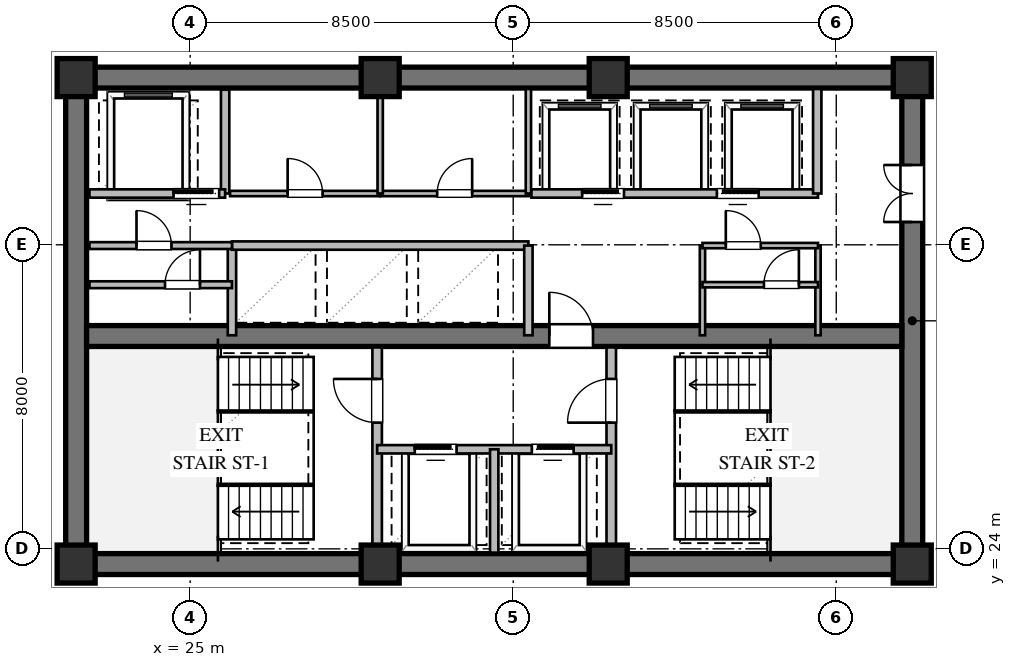
"""IFC4 building model, lengths in metres.
Left out: names, types, materials, properties, quantities, classifications, styles, units other than length and angle.
Written with IfcOpenShell. Run it as: python <this file> out.ifc"""

import sys

from ifc_helpers import new_model, si_unit, direction, frame, frame_2d, origin, origin_2d, place, context, subcontext, project, spatial, rectangle, extrude, element, fill, save


model = new_model("IFC4")
c1 = context("Model", 3, precision=1e-05, world=origin(), true_north=direction((0.0, 1.0)))
c2 = subcontext(c1, "Body", "Model", "MODEL_VIEW")
j1 = project(units=[si_unit("LENGTHUNIT", "METRE"), si_unit("PLANEANGLEUNIT", "RADIAN")], contexts=[c1])
p1 = place(None, origin())
s1 = spatial("IfcSite", under=j1, at=p1, CompositionType="ELEMENT")
p2 = place(p1, origin())
s2 = spatial("IfcBuilding", under=s1, at=p2, CompositionType="ELEMENT")
p3 = place(p2, frame((0.0, 0.0, 156.6)))
s3 = spatial("IfcBuildingStorey", under=s2, at=p3, CompositionType="ELEMENT", Elevation=156.6)
for number, where, z_axis, x_axis in (
    (1, (21.725, 23.6, 0.0), (0.0, 0.0, 1.0), (1.0, 0.0, 0.0)),
    (2, (21.725, 36.4, 0.0), (0.0, 0.0, 1.0), (1.0, 0.0, 0.0)),
):
    element("IfcWall", number, at=place(p3, frame(where, z_axis=z_axis, x_axis=x_axis)), inside=s3, PredefinedType="SHEAR", context=c2, shape_type="SweptSolid", body=[
        extrude(rectangle(XDim=22.55, YDim=0.55, at=frame_2d((11.275, 0.0))), origin(), (0.0, 0.0, 1.0), 3.36),
    ])
p4 = place(p3, frame((22.0, 23.875, 0.0), z_axis=(0.0, 0.0, 1.0), x_axis=(0.0, 1.0, 0.0)))
e3 = element("IfcWall", 3, at=p4, inside=s3, PredefinedType="SHEAR", context=c2, shape_type="SweptSolid", body=[
    extrude(rectangle(XDim=12.25, YDim=0.55, at=frame_2d((6.125, 0.0))), origin(), (0.0, 0.0, 1.0), 3.36),
])
p5 = place(p3, frame((44.0, 23.875, 0.0), z_axis=(0.0, 0.0, 1.0), x_axis=(0.0, 1.0, 0.0)))
e4 = element("IfcWall", 4, at=p5, inside=s3, PredefinedType="SHEAR", context=c2, shape_type="SweptSolid", body=[
    extrude(rectangle(XDim=12.25, YDim=0.55, at=frame_2d((6.125, 0.0))), origin(), (0.0, 0.0, 1.0), 3.36),
])
p6 = place(p5, frame((8.725, 0.0, 0.0)))
e5 = element("IfcOpeningElement", 5, at=p6, cuts=e4, PredefinedType="OPENING", context=c2, shape_type="SweptSolid", body=[
    extrude(rectangle(XDim=1.5, YDim=2.15, at=frame_2d((0.75, 1.075))), frame((0.0, 0.285, 0.0), z_axis=(0.0, -1.0, 0.0), x_axis=(1.0, 0.0, 0.0)), (0.0, 0.0, 1.0), 0.57),
])
p7 = place(p3, frame((22.275, 29.6, 0.0), z_axis=(0.0, 0.0, 1.0), x_axis=(1.0, 0.0, 0.0)))
e6 = element("IfcWall", 6, at=p7, inside=s3, PredefinedType="SHEAR", context=c2, shape_type="SweptSolid", body=[
    extrude(rectangle(XDim=21.45, YDim=0.55, at=frame_2d((10.725, 0.0))), origin(), (0.0, 0.0, 1.0), 3.36),
])
p8 = place(p7, frame((12.175, 0.0, 0.0)))
e7 = element("IfcOpeningElement", 7, at=p8, cuts=e6, PredefinedType="OPENING", context=c2, shape_type="SweptSolid", body=[
    extrude(rectangle(XDim=1.15, YDim=2.1, at=frame_2d((0.575, 1.05))), frame((0.0, 0.285, 0.0), z_axis=(0.0, -1.0, 0.0), x_axis=(1.0, 0.0, 0.0)), (0.0, 0.0, 1.0), 0.57),
])
for number, where, z_axis, x_axis in (
    (8, (22.0, 23.6, 0.0), (0.0, 0.0, 1.0), (1.0, 0.0, 0.0)),
    (9, (30.0, 23.6, 0.0), (0.0, 0.0, 1.0), (1.0, 0.0, 0.0)),
    (10, (36.0, 23.6, 0.0), (0.0, 0.0, 1.0), (1.0, 0.0, 0.0)),
    (11, (44.0, 23.6, 0.0), (0.0, 0.0, 1.0), (1.0, 0.0, 0.0)),
    (12, (44.0, 36.4, 0.0), (0.0, 0.0, 1.0), (1.0, 0.0, 0.0)),
    (13, (36.0, 36.4, 0.0), (0.0, 0.0, 1.0), (1.0, 0.0, 0.0)),
    (14, (30.0, 36.4, 0.0), (0.0, 0.0, 1.0), (1.0, 0.0, 0.0)),
    (15, (22.0, 36.4, 0.0), (0.0, 0.0, 1.0), (1.0, 0.0, 0.0)),
):
    element("IfcColumn", number, at=place(p3, frame(where, z_axis=z_axis, x_axis=x_axis)), inside=s3, PredefinedType="COLUMN", context=c2, shape_type="SweptSolid", body=[
        extrude(rectangle(XDim=1.0, YDim=1.0, at=origin_2d()), origin(), (0.0, 0.0, 1.0), 3.6),
    ])
p9 = place(p3, frame((29.92, 23.9, 0.0), z_axis=(0.0, 0.0, 1.0), x_axis=(0.0, 1.0, 0.0)))
e16 = element("IfcWall", 16, at=p9, inside=s3, PredefinedType="SOLIDWALL", context=c2, shape_type="SweptSolid", body=[
    extrude(rectangle(XDim=5.4, YDim=0.25, at=frame_2d((2.7, 0.0))), origin(), (0.0, 0.0, 1.0), 2.89),
])
p10 = place(p9, frame((3.421, 0.0, 0.0)))
e17 = element("IfcOpeningElement", 17, at=p10, cuts=e16, PredefinedType="OPENING", context=c2, shape_type="SweptSolid", body=[
    extrude(rectangle(XDim=1.15, YDim=2.1, at=frame_2d((0.575, 1.05))), frame((0.0, 0.135, 0.0), z_axis=(0.0, -1.0, 0.0), x_axis=(1.0, 0.0, 0.0)), (0.0, 0.0, 1.0), 0.27),
])
p11 = place(p3, frame((36.08, 23.9, 0.0), z_axis=(0.0, 0.0, 1.0), x_axis=(0.0, 1.0, 0.0)))
e18 = element("IfcWall", 18, at=p11, inside=s3, PredefinedType="SOLIDWALL", context=c2, shape_type="SweptSolid", body=[
    extrude(rectangle(XDim=5.4, YDim=0.25, at=frame_2d((2.7, 0.0))), origin(), (0.0, 0.0, 1.0), 3.36),
])
p12 = place(p11, frame((3.421, 0.0, 0.0)))
e19 = element("IfcOpeningElement", 19, at=p12, cuts=e18, PredefinedType="OPENING", context=c2, shape_type="SweptSolid", body=[
    extrude(rectangle(XDim=1.15, YDim=2.1, at=frame_2d((0.575, 1.05))), frame((0.0, 0.135, 0.0), z_axis=(0.0, -1.0, 0.0), x_axis=(1.0, 0.0, 0.0)), (0.0, 0.0, 1.0), 0.27),
])
p13 = place(p3, frame((29.92, 26.62, 0.0), z_axis=(0.0, 0.0, 1.0), x_axis=(1.0, 0.0, 0.0)))
e20 = element("IfcWall", 20, at=p13, inside=s3, PredefinedType="SOLIDWALL", context=c2, shape_type="SweptSolid", body=[
    extrude(rectangle(XDim=6.16, YDim=0.22, at=frame_2d((3.08, 0.0))), origin(), (0.0, 0.0, 1.0), 3.36),
])
p14 = place(p13, frame((0.99, 0.0, 0.0)))
e21 = element("IfcOpeningElement", 21, at=p14, cuts=e20, PredefinedType="OPENING", context=c2, shape_type="SweptSolid", body=[
    extrude(rectangle(XDim=1.1, YDim=2.1, at=frame_2d((0.55, 1.05))), frame((0.0, 0.12, 0.0), z_axis=(0.0, -1.0, 0.0), x_axis=(1.0, 0.0, 0.0)), (0.0, 0.0, 1.0), 0.24),
])
p15 = place(p13, frame((4.07, 0.0, 0.0)))
e22 = element("IfcOpeningElement", 22, at=p15, cuts=e20, PredefinedType="OPENING", context=c2, shape_type="SweptSolid", body=[
    extrude(rectangle(XDim=1.1, YDim=2.1, at=frame_2d((0.55, 1.05))), frame((0.0, 0.12, 0.0), z_axis=(0.0, -1.0, 0.0), x_axis=(1.0, 0.0, 0.0)), (0.0, 0.0, 1.0), 0.24),
])
p16 = place(p3, frame((33.0, 23.9, 0.0), z_axis=(0.0, 0.0, 1.0), x_axis=(0.0, 1.0, 0.0)))
e23 = element("IfcWall", 23, at=p16, inside=s3, PredefinedType="SOLIDWALL", context=c2, shape_type="SweptSolid", body=[
    extrude(rectangle(XDim=2.72, YDim=0.22, at=frame_2d((1.36, 0.0))), origin(), (0.0, 0.0, 1.0), 3.36),
])
p17 = place(p3, frame((25.92, 33.35, 0.0), z_axis=(0.0, 0.0, 1.0), x_axis=(0.0, 1.0, 0.0)))
e24 = element("IfcWall", 24, at=p17, inside=s3, PredefinedType="SOLIDWALL", context=c2, shape_type="SweptSolid", body=[
    extrude(rectangle(XDim=2.73, YDim=0.22, at=frame_2d((1.365, 0.0))), origin(), (0.0, 0.0, 1.0), 3.36),
])
p18 = place(p3, frame((22.35, 33.35, 0.0), z_axis=(0.0, 0.0, 1.0), x_axis=(1.0, 0.0, 0.0)))
e25 = element("IfcWall", 25, at=p18, inside=s3, PredefinedType="SOLIDWALL", context=c2, shape_type="SweptSolid", body=[
    extrude(rectangle(XDim=3.57, YDim=0.22, at=frame_2d((1.785, 0.0))), origin(), (0.0, 0.0, 1.0), 3.36),
])
p19 = place(p18, frame((2.213, 0.0, 0.0)))
e26 = element("IfcOpeningElement", 26, at=p19, cuts=e25, PredefinedType="OPENING", context=c2, shape_type="SweptSolid", body=[
    extrude(rectangle(XDim=1.2, YDim=2.1, at=frame_2d((0.6, 1.05))), frame((0.0, 0.12, 0.0), z_axis=(0.0, -1.0, 0.0), x_axis=(1.0, 0.0, 0.0)), (0.0, 0.0, 1.0), 0.24),
])
p20 = place(p3, frame((26.1, 29.62, 0.0), z_axis=(0.0, 0.0, 1.0), x_axis=(0.0, 1.0, 0.0)))
e27 = element("IfcWall", 27, at=p20, inside=s3, PredefinedType="SOLIDWALL", context=c2, shape_type="SweptSolid", body=[
    extrude(rectangle(XDim=2.36, YDim=0.22, at=frame_2d((1.18, 0.0))), origin(), (0.0, 0.0, 1.0), 3.36),
])
p21 = place(p3, frame((26.1, 31.98, 0.0), z_axis=(0.0, 0.0, 1.0), x_axis=(1.0, 0.0, 0.0)))
e28 = element("IfcWall", 28, at=p21, inside=s3, PredefinedType="SOLIDWALL", context=c2, shape_type="SweptSolid", body=[
    extrude(rectangle(XDim=7.8, YDim=0.22, at=frame_2d((3.9, 0.0))), origin(), (0.0, 0.0, 1.0), 3.36),
])
p22 = place(p3, frame((33.9, 29.62, 0.0), z_axis=(0.0, 0.0, 1.0), x_axis=(0.0, 1.0, 0.0)))
e29 = element("IfcWall", 29, at=p22, inside=s3, PredefinedType="SOLIDWALL", context=c2, shape_type="SweptSolid", body=[
    extrude(rectangle(XDim=2.36, YDim=0.22, at=frame_2d((1.18, 0.0))), origin(), (0.0, 0.0, 1.0), 3.36),
])
p23 = place(p3, frame((26.05, 33.35, 0.0), z_axis=(0.0, 0.0, 1.0), x_axis=(1.0, 0.0, 0.0)))
e30 = element("IfcWall", 30, at=p23, inside=s3, PredefinedType="PARTITIONING", context=c2, shape_type="SweptSolid", body=[
    extrude(rectangle(XDim=3.95, YDim=0.14, at=frame_2d((1.975, 0.0))), origin(), (0.0, 0.0, 1.0), 3.36),
])
p24 = place(p23, frame((1.515, 0.0, 0.0)))
e31 = element("IfcOpeningElement", 31, at=p24, cuts=e30, PredefinedType="OPENING", context=c2, shape_type="SweptSolid", body=[
    extrude(rectangle(XDim=0.92, YDim=2.1, at=frame_2d((0.46, 1.05))), frame((0.0, 0.08, 0.0), z_axis=(0.0, -1.0, 0.0), x_axis=(1.0, 0.0, 0.0)), (0.0, 0.0, 1.0), 0.16),
])
p25 = place(p3, frame((30.0, 33.35, 0.0), z_axis=(0.0, 0.0, 1.0), x_axis=(1.0, 0.0, 0.0)))
e32 = element("IfcWall", 32, at=p25, inside=s3, PredefinedType="PARTITIONING", context=c2, shape_type="SweptSolid", body=[
    extrude(rectangle(XDim=3.92, YDim=0.14, at=frame_2d((1.96, 0.0))), origin(), (0.0, 0.0, 1.0), 3.36),
])
p26 = place(p25, frame((1.5, 0.0, 0.0)))
e33 = element("IfcOpeningElement", 33, at=p26, cuts=e32, PredefinedType="OPENING", context=c2, shape_type="SweptSolid", body=[
    extrude(rectangle(XDim=0.92, YDim=2.1, at=frame_2d((0.46, 1.05))), frame((0.0, 0.08, 0.0), z_axis=(0.0, -1.0, 0.0), x_axis=(1.0, 0.0, 0.0)), (0.0, 0.0, 1.0), 0.16),
])
for number, where, z_axis, x_axis in (
    (34, (30.0, 33.35, 0.0), (0.0, 0.0, 1.0), (0.0, 1.0, 0.0)),
    (35, (33.9, 33.35, 0.0), (0.0, 0.0, 1.0), (0.0, 1.0, 0.0)),
):
    element("IfcWall", number, at=place(p3, frame(where, z_axis=z_axis, x_axis=x_axis)), inside=s3, PredefinedType="PARTITIONING", context=c2, shape_type="SweptSolid", body=[
        extrude(rectangle(XDim=2.75, YDim=0.14, at=frame_2d((1.375, 0.0))), origin(), (0.0, 0.0, 1.0), 3.36),
    ])
p27 = place(p3, frame((33.98, 33.35, 0.0), z_axis=(0.0, 0.0, 1.0), x_axis=(1.0, 0.0, 0.0)))
e36 = element("IfcWall", 36, at=p27, inside=s3, PredefinedType="SOLIDWALL", context=c2, shape_type="SweptSolid", body=[
    extrude(rectangle(XDim=7.54, YDim=0.22, at=frame_2d((3.77, 0.0))), origin(), (0.0, 0.0, 1.0), 3.36),
])
p28 = place(p27, frame((1.335, 0.0, 0.0)))
e37 = element("IfcOpeningElement", 37, at=p28, cuts=e36, PredefinedType="OPENING", context=c2, shape_type="SweptSolid", body=[
    extrude(rectangle(XDim=1.1, YDim=2.1, at=frame_2d((0.55, 1.05))), frame((0.0, 0.12, 0.0), z_axis=(0.0, -1.0, 0.0), x_axis=(1.0, 0.0, 0.0)), (0.0, 0.0, 1.0), 0.24),
])
p29 = place(p27, frame((4.879, 0.0, 0.0)))
e38 = element("IfcOpeningElement", 38, at=p29, cuts=e36, PredefinedType="OPENING", context=c2, shape_type="SweptSolid", body=[
    extrude(rectangle(XDim=1.1, YDim=2.1, at=frame_2d((0.55, 1.05))), frame((0.0, 0.12, 0.0), z_axis=(0.0, -1.0, 0.0), x_axis=(1.0, 0.0, 0.0)), (0.0, 0.0, 1.0), 0.24),
])
p30 = place(p3, frame((41.5, 33.35, 0.0), z_axis=(0.0, 0.0, 1.0), x_axis=(0.0, 1.0, 0.0)))
e39 = element("IfcWall", 39, at=p30, inside=s3, PredefinedType="SOLIDWALL", context=c2, shape_type="SweptSolid", body=[
    extrude(rectangle(XDim=2.75, YDim=0.22, at=frame_2d((1.375, 0.0))), origin(), (0.0, 0.0, 1.0), 3.36),
])
p31 = place(p3, frame((22.35, 30.95, 0.0), z_axis=(0.0, 0.0, 1.0), x_axis=(1.0, 0.0, 0.0)))
e40 = element("IfcWall", 40, at=p31, inside=s3, PredefinedType="PARTITIONING", context=c2, shape_type="SweptSolid", body=[
    extrude(rectangle(XDim=3.75, YDim=0.18, at=frame_2d((1.875, 0.0))), origin(), (0.0, 0.0, 1.0), 3.36),
])
p32 = place(p31, frame((1.988, 0.0, 0.0)))
e41 = element("IfcOpeningElement", 41, at=p32, cuts=e40, PredefinedType="OPENING", context=c2, shape_type="SweptSolid", body=[
    extrude(rectangle(XDim=0.92, YDim=2.1, at=frame_2d((0.46, 1.05))), frame((0.0, 0.1, 0.0), z_axis=(0.0, -1.0, 0.0), x_axis=(1.0, 0.0, 0.0)), (0.0, 0.0, 1.0), 0.2),
])
p33 = place(p3, frame((22.35, 31.98, 0.0), z_axis=(0.0, 0.0, 1.0), x_axis=(1.0, 0.0, 0.0)))
e42 = element("IfcWall", 42, at=p33, inside=s3, PredefinedType="PARTITIONING", context=c2, shape_type="SweptSolid", body=[
    extrude(rectangle(XDim=3.75, YDim=0.18, at=frame_2d((1.875, 0.0))), origin(), (0.0, 0.0, 1.0), 3.36),
])
p34 = place(p33, frame((1.238, 0.0, 0.0)))
e43 = element("IfcOpeningElement", 43, at=p34, cuts=e42, PredefinedType="OPENING", context=c2, shape_type="SweptSolid", body=[
    extrude(rectangle(XDim=0.92, YDim=2.1, at=frame_2d((0.46, 1.05))), frame((0.0, 0.1, 0.0), z_axis=(0.0, -1.0, 0.0), x_axis=(1.0, 0.0, 0.0)), (0.0, 0.0, 1.0), 0.2),
])
for number, where, z_axis, x_axis in (
    (44, (38.48, 29.62, 0.0), (0.0, 0.0, 1.0), (0.0, 1.0, 0.0)),
    (45, (41.52, 29.62, 0.0), (0.0, 0.0, 1.0), (0.0, 1.0, 0.0)),
):
    element("IfcWall", number, at=place(p3, frame(where, z_axis=z_axis, x_axis=x_axis)), inside=s3, PredefinedType="PARTITIONING", context=c2, shape_type="SweptSolid", body=[
        extrude(rectangle(XDim=2.36, YDim=0.14, at=frame_2d((1.18, 0.0))), origin(), (0.0, 0.0, 1.0), 3.36),
    ])
p35 = place(p3, frame((38.48, 30.95, 0.0), z_axis=(0.0, 0.0, 1.0), x_axis=(1.0, 0.0, 0.0)))
e46 = element("IfcWall", 46, at=p35, inside=s3, PredefinedType="PARTITIONING", context=c2, shape_type="SweptSolid", body=[
    extrude(rectangle(XDim=3.04, YDim=0.14, at=frame_2d((1.52, 0.0))), origin(), (0.0, 0.0, 1.0), 3.36),
])
p36 = place(p35, frame((1.617, 0.0, 0.0)))
e47 = element("IfcOpeningElement", 47, at=p36, cuts=e46, PredefinedType="OPENING", context=c2, shape_type="SweptSolid", body=[
    extrude(rectangle(XDim=0.92, YDim=2.1, at=frame_2d((0.46, 1.05))), frame((0.0, 0.08, 0.0), z_axis=(0.0, -1.0, 0.0), x_axis=(1.0, 0.0, 0.0)), (0.0, 0.0, 1.0), 0.16),
])
p37 = place(p3, frame((38.48, 31.98, 0.0), z_axis=(0.0, 0.0, 1.0), x_axis=(1.0, 0.0, 0.0)))
e48 = element("IfcWall", 48, at=p37, inside=s3, PredefinedType="PARTITIONING", context=c2, shape_type="SweptSolid", body=[
    extrude(rectangle(XDim=3.04, YDim=0.14, at=frame_2d((1.52, 0.0))), origin(), (0.0, 0.0, 1.0), 3.36),
])
p38 = place(p37, frame((0.614, 0.0, 0.0)))
e49 = element("IfcOpeningElement", 49, at=p38, cuts=e48, PredefinedType="OPENING", context=c2, shape_type="SweptSolid", body=[
    extrude(rectangle(XDim=0.92, YDim=2.1, at=frame_2d((0.46, 1.05))), frame((0.0, 0.08, 0.0), z_axis=(0.0, -1.0, 0.0), x_axis=(1.0, 0.0, 0.0)), (0.0, 0.0, 1.0), 0.16),
])
p39 = place(p10, origin())
e50 = element("IfcDoor", 50, at=p39, inside=s3, OperationType="SINGLE_SWING_RIGHT", PredefinedType="DOOR", context=c2, shape_type="SweptSolid", body=[
    extrude(rectangle(XDim=1.15, YDim=2.1, at=frame_2d((0.575, 1.05))), frame((0.0, 0.025, 0.0), z_axis=(0.0, -1.0, 0.0), x_axis=(1.0, 0.0, 0.0)), (0.0, 0.0, 1.0), 0.05),
])
fill(e17, e50)
p40 = place(p12, origin())
e51 = element("IfcDoor", 51, at=p40, inside=s3, OperationType="SINGLE_SWING_LEFT", PredefinedType="DOOR", context=c2, shape_type="SweptSolid", body=[
    extrude(rectangle(XDim=1.15, YDim=2.1, at=frame_2d((0.575, 1.05))), frame((0.0, 0.025, 0.0), z_axis=(0.0, -1.0, 0.0), x_axis=(1.0, 0.0, 0.0)), (0.0, 0.0, 1.0), 0.05),
])
fill(e19, e51)
p41 = place(p14, origin())
e52 = element("IfcDoor", 52, at=p41, inside=s3, OperationType="SLIDING_TO_LEFT", PredefinedType="DOOR", context=c2, shape_type="SweptSolid", body=[
    extrude(rectangle(XDim=1.1, YDim=2.1, at=frame_2d((0.55, 1.05))), frame((0.0, 0.025, 0.0), z_axis=(0.0, -1.0, 0.0), x_axis=(1.0, 0.0, 0.0)), (0.0, 0.0, 1.0), 0.05),
])
fill(e21, e52)
p42 = place(p15, origin())
e53 = element("IfcDoor", 53, at=p42, inside=s3, OperationType="SLIDING_TO_RIGHT", PredefinedType="DOOR", context=c2, shape_type="SweptSolid", body=[
    extrude(rectangle(XDim=1.1, YDim=2.1, at=frame_2d((0.55, 1.05))), frame((0.0, 0.025, 0.0), z_axis=(0.0, -1.0, 0.0), x_axis=(1.0, 0.0, 0.0)), (0.0, 0.0, 1.0), 0.05),
])
fill(e22, e53)
p43 = place(p8, origin())
e54 = element("IfcDoor", 54, at=p43, inside=s3, OperationType="SINGLE_SWING_LEFT", PredefinedType="DOOR", context=c2, shape_type="SweptSolid", body=[
    extrude(rectangle(XDim=1.15, YDim=2.1, at=frame_2d((0.575, 1.05))), frame((0.0, 0.025, 0.0), z_axis=(0.0, -1.0, 0.0), x_axis=(1.0, 0.0, 0.0)), (0.0, 0.0, 1.0), 0.05),
])
fill(e7, e54)
p44 = place(p6, origin())
e55 = element("IfcDoor", 55, at=p44, inside=s3, OperationType="DOUBLE_DOOR_SINGLE_SWING", PredefinedType="DOOR", context=c2, shape_type="SweptSolid", body=[
    extrude(rectangle(XDim=1.5, YDim=2.15, at=frame_2d((0.75, 1.075))), frame((0.0, 0.025, 0.0), z_axis=(0.0, -1.0, 0.0), x_axis=(1.0, 0.0, 0.0)), (0.0, 0.0, 1.0), 0.05),
])
fill(e5, e55)
p45 = place(p19, origin())
e56 = element("IfcDoor", 56, at=p45, inside=s3, OperationType="SLIDING_TO_LEFT", PredefinedType="DOOR", context=c2, shape_type="SweptSolid", body=[
    extrude(rectangle(XDim=1.2, YDim=2.1, at=frame_2d((0.6, 1.05))), frame((0.0, 0.025, 0.0), z_axis=(0.0, -1.0, 0.0), x_axis=(1.0, 0.0, 0.0)), (0.0, 0.0, 1.0), 0.05),
])
fill(e26, e56)
p46 = place(p24, origin())
e57 = element("IfcDoor", 57, at=p46, inside=s3, OperationType="SINGLE_SWING_LEFT", PredefinedType="DOOR", context=c2, shape_type="SweptSolid", body=[
    extrude(rectangle(XDim=0.92, YDim=2.1, at=frame_2d((0.46, 1.05))), frame((0.0, 0.025, 0.0), z_axis=(0.0, -1.0, 0.0), x_axis=(1.0, 0.0, 0.0)), (0.0, 0.0, 1.0), 0.05),
])
fill(e31, e57)
p47 = place(p26, origin())
e58 = element("IfcDoor", 58, at=p47, inside=s3, OperationType="SINGLE_SWING_RIGHT", PredefinedType="DOOR", context=c2, shape_type="SweptSolid", body=[
    extrude(rectangle(XDim=0.92, YDim=2.1, at=frame_2d((0.46, 1.05))), frame((0.0, 0.025, 0.0), z_axis=(0.0, -1.0, 0.0), x_axis=(1.0, 0.0, 0.0)), (0.0, 0.0, 1.0), 0.05),
])
fill(e33, e58)
p48 = place(p28, origin())
e59 = element("IfcDoor", 59, at=p48, inside=s3, OperationType="SLIDING_TO_LEFT", PredefinedType="DOOR", context=c2, shape_type="SweptSolid", body=[
    extrude(rectangle(XDim=1.1, YDim=2.1, at=frame_2d((0.55, 1.05))), frame((0.0, 0.025, 0.0), z_axis=(0.0, -1.0, 0.0), x_axis=(1.0, 0.0, 0.0)), (0.0, 0.0, 1.0), 0.05),
])
fill(e37, e59)
p49 = place(p29, origin())
e60 = element("IfcDoor", 60, at=p49, inside=s3, OperationType="SLIDING_TO_RIGHT", PredefinedType="DOOR", context=c2, shape_type="SweptSolid", body=[
    extrude(rectangle(XDim=1.1, YDim=2.1, at=frame_2d((0.55, 1.05))), frame((0.0, 0.025, 0.0), z_axis=(0.0, -1.0, 0.0), x_axis=(1.0, 0.0, 0.0)), (0.0, 0.0, 1.0), 0.05),
])
fill(e38, e60)
p50 = place(p34, origin())
e61 = element("IfcDoor", 61, at=p50, inside=s3, OperationType="SINGLE_SWING_LEFT", PredefinedType="DOOR", context=c2, shape_type="SweptSolid", body=[
    extrude(rectangle(XDim=0.92, YDim=2.1, at=frame_2d((0.46, 1.05))), frame((0.0, 0.025, 0.0), z_axis=(0.0, -1.0, 0.0), x_axis=(1.0, 0.0, 0.0)), (0.0, 0.0, 1.0), 0.05),
])
fill(e43, e61)
p51 = place(p32, origin())
e62 = element("IfcDoor", 62, at=p51, inside=s3, OperationType="SINGLE_SWING_RIGHT", PredefinedType="DOOR", context=c2, shape_type="SweptSolid", body=[
    extrude(rectangle(XDim=0.92, YDim=2.1, at=frame_2d((0.46, 1.05))), frame((0.0, 0.025, 0.0), z_axis=(0.0, -1.0, 0.0), x_axis=(1.0, 0.0, 0.0)), (0.0, 0.0, 1.0), 0.05),
])
fill(e41, e62)
p52 = place(p38, origin())
e63 = element("IfcDoor", 63, at=p52, inside=s3, OperationType="SINGLE_SWING_LEFT", PredefinedType="DOOR", context=c2, shape_type="SweptSolid", body=[
    extrude(rectangle(XDim=0.92, YDim=2.1, at=frame_2d((0.46, 1.05))), frame((0.0, 0.025, 0.0), z_axis=(0.0, -1.0, 0.0), x_axis=(1.0, 0.0, 0.0)), (0.0, 0.0, 1.0), 0.05),
])
fill(e49, e63)
p53 = place(p36, origin())
e64 = element("IfcDoor", 64, at=p53, inside=s3, OperationType="SINGLE_SWING_RIGHT", PredefinedType="DOOR", context=c2, shape_type="SweptSolid", body=[
    extrude(rectangle(XDim=0.92, YDim=2.1, at=frame_2d((0.46, 1.05))), frame((0.0, 0.025, 0.0), z_axis=(0.0, -1.0, 0.0), x_axis=(1.0, 0.0, 0.0)), (0.0, 0.0, 1.0), 0.05),
])
fill(e47, e64)
save(model, sys.argv[1])
